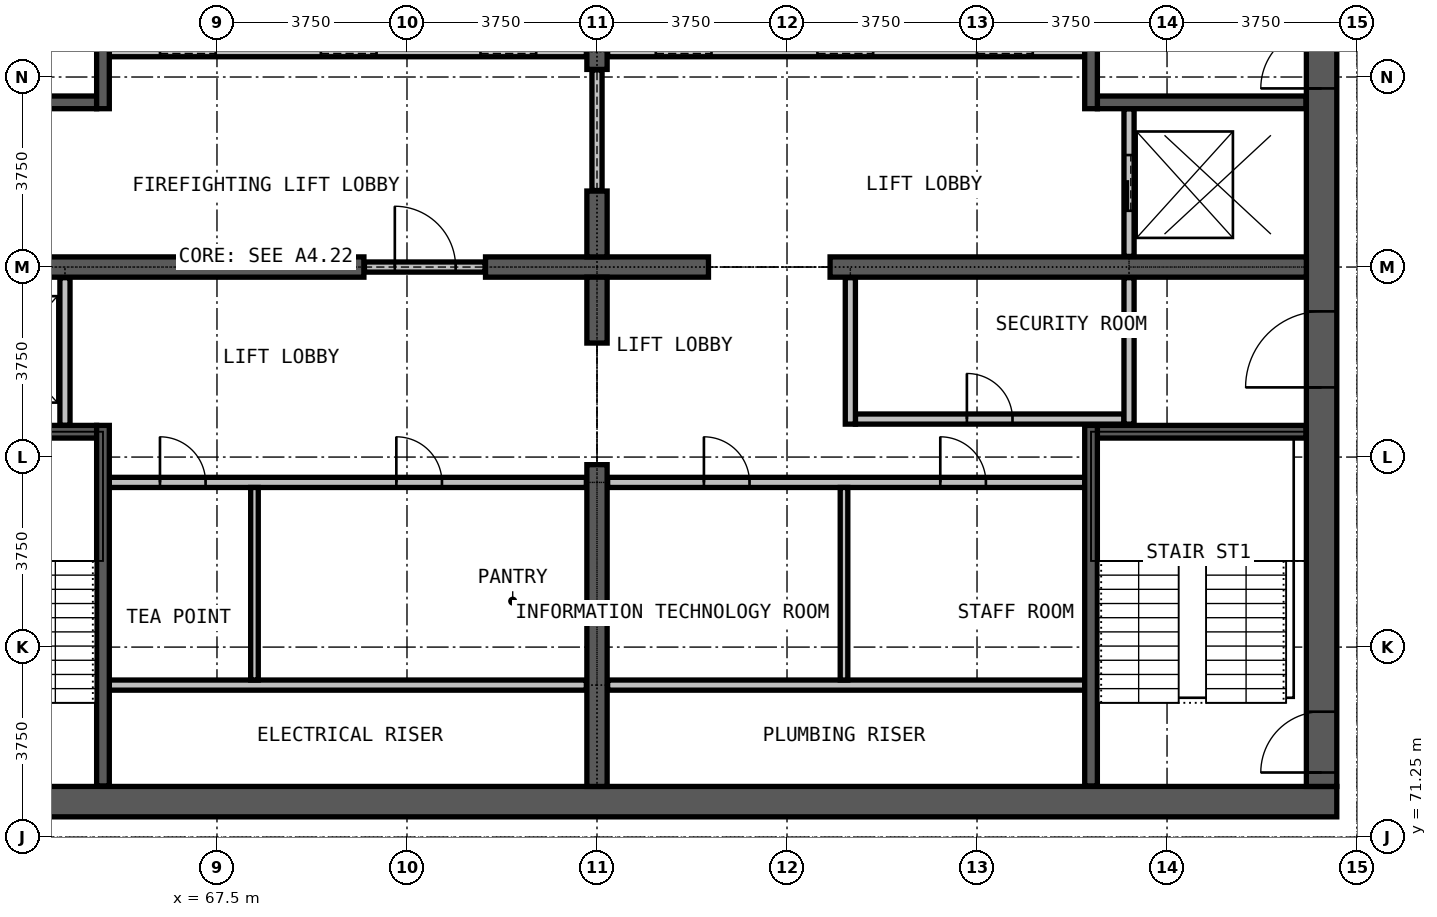
"""IFC4 building model, lengths in metres.
Left out: names, types, materials, properties, quantities, classifications, styles, units other than length and angle.
Written with IfcOpenShell. Run it as: python <this file> out.ifc"""

import sys

from ifc_helpers import new_model, si_unit, direction, frame, frame_2d, origin, place, context, subcontext, project, spatial, rectangle, extrude, element, fill, save


model = new_model("IFC4")
c1 = context("Model", 3, precision=1e-05, world=origin(), true_north=direction((0.0, 1.0)))
c2 = subcontext(c1, "Body", "Model", "MODEL_VIEW")
j1 = project(units=[si_unit("LENGTHUNIT", "METRE"), si_unit("PLANEANGLEUNIT", "RADIAN")], contexts=[c1])
p1 = place(None, origin())
s1 = spatial("IfcSite", under=j1, at=p1, CompositionType="ELEMENT")
p2 = place(p1, origin())
s2 = spatial("IfcBuilding", under=s1, at=p2, CompositionType="ELEMENT")
p3 = place(p2, frame((0.0, 0.0, 192.3)))
s3 = spatial("IfcBuildingStorey", under=s2, at=p3, CompositionType="ELEMENT", Elevation=192.3)
p4 = place(p3, frame((60.4, 71.95, 0.0), z_axis=(0.0, 0.0, 1.0), x_axis=(1.0, 0.0, 0.0)))
e1 = element("IfcWall", 1, at=p4, inside=s3, PredefinedType="SHEAR", context=c2, shape_type="SweptSolid", body=[
    extrude(rectangle(XDim=29.2, YDim=0.6, at=frame_2d((14.6, 0.0))), origin(), (0.0, 0.0, 1.0), 3.6),
])
p5 = place(p3, frame((89.3, 72.25, 0.0), z_axis=(0.0, 0.0, 1.0), x_axis=(0.0, 1.0, 0.0)))
e2 = element("IfcWall", 2, at=p5, inside=s3, PredefinedType="SHEAR", context=c2, shape_type="SweptSolid", body=[
    extrude(rectangle(XDim=20.5, YDim=0.6, at=frame_2d((10.25, 0.0))), origin(), (0.0, 0.0, 1.0), 3.6),
])
p6 = place(p5, frame((0.275, 0.0, 0.0)))
e3 = element("IfcOpeningElement", 3, at=p6, cuts=e2, PredefinedType="OPENING", context=c2, shape_type="SweptSolid", body=[
    extrude(rectangle(XDim=1.2, YDim=2.2, at=frame_2d((0.6, 1.1))), frame((0.0, 0.31, 0.0), z_axis=(0.0, -1.0, 0.0), x_axis=(1.0, 0.0, 0.0)), (0.0, 0.0, 1.0), 0.62),
])
p7 = place(p5, frame((13.775, 0.0, 0.0)))
e4 = element("IfcOpeningElement", 4, at=p7, cuts=e2, PredefinedType="OPENING", context=c2, shape_type="SweptSolid", body=[
    extrude(rectangle(XDim=1.2, YDim=2.2, at=frame_2d((0.6, 1.1))), frame((0.0, 0.31, 0.0), z_axis=(0.0, -1.0, 0.0), x_axis=(1.0, 0.0, 0.0)), (0.0, 0.0, 1.0), 0.62),
])
p8 = place(p5, frame((7.875, 0.0, 0.0)))
e5 = element("IfcOpeningElement", 5, at=p8, cuts=e2, PredefinedType="OPENING", context=c2, shape_type="SweptSolid", body=[
    extrude(rectangle(XDim=1.5, YDim=2.2, at=frame_2d((0.75, 1.1))), frame((0.0, 0.31, 0.0), z_axis=(0.0, -1.0, 0.0), x_axis=(1.0, 0.0, 0.0)), (0.0, 0.0, 1.0), 0.62),
])
p9 = place(p3, frame((61.0, 82.5, 0.0), z_axis=(0.0, 0.0, 1.0), x_axis=(1.0, 0.0, 0.0)))
e6 = element("IfcWall", 6, at=p9, inside=s3, PredefinedType="SHEAR", context=c2, shape_type="SweptSolid", body=[
    extrude(rectangle(XDim=9.4, YDim=0.4, at=frame_2d((4.7, 0.0))), origin(), (0.0, 0.0, 1.0), 3.6),
])
p10 = place(p3, frame((72.8, 82.5, 0.0), z_axis=(0.0, 0.0, 1.0), x_axis=(1.0, 0.0, 0.0)))
e7 = element("IfcWall", 7, at=p10, inside=s3, PredefinedType="SHEAR", context=c2, shape_type="SweptSolid", body=[
    extrude(rectangle(XDim=4.4, YDim=0.4, at=frame_2d((2.2, 0.0))), origin(), (0.0, 0.0, 1.0), 3.6),
])
p11 = place(p3, frame((79.6, 82.5, 0.0), z_axis=(0.0, 0.0, 1.0), x_axis=(1.0, 0.0, 0.0)))
e8 = element("IfcWall", 8, at=p11, inside=s3, PredefinedType="SHEAR", context=c2, shape_type="SweptSolid", body=[
    extrude(rectangle(XDim=9.4, YDim=0.4, at=frame_2d((4.7, 0.0))), origin(), (0.0, 0.0, 1.0), 3.6),
])
p12 = place(p3, frame((75.0, 72.25, 0.0), z_axis=(0.0, 0.0, 1.0), x_axis=(0.0, 1.0, 0.0)))
e9 = element("IfcWall", 9, at=p12, inside=s3, PredefinedType="SHEAR", context=c2, shape_type="SweptSolid", body=[
    extrude(rectangle(XDim=6.35, YDim=0.4, at=frame_2d((3.175, 0.0))), origin(), (0.0, 0.0, 1.0), 3.6),
])
for number, where, z_axis, x_axis in (
    (10, (75.0, 81.0, 0.0), (0.0, 0.0, 1.0), (0.0, 1.0, 0.0)),
    (11, (75.0, 82.7, 0.0), (0.0, 0.0, 1.0), (0.0, 1.0, 0.0)),
):
    element("IfcWall", number, at=place(p3, frame(where, z_axis=z_axis, x_axis=x_axis)), inside=s3, PredefinedType="SHEAR", context=c2, shape_type="SweptSolid", body=[
        extrude(rectangle(XDim=1.3, YDim=0.4, at=frame_2d((0.65, 0.0))), origin(), (0.0, 0.0, 1.0), 3.6),
    ])
p13 = place(p3, frame((75.0, 86.4, 0.0), z_axis=(0.0, 0.0, 1.0), x_axis=(0.0, 1.0, 0.0)))
e12 = element("IfcWall", 12, at=p13, inside=s3, PredefinedType="SHEAR", context=c2, shape_type="SweptSolid", body=[
    extrude(rectangle(XDim=6.35, YDim=0.4, at=frame_2d((3.175, 0.0))), origin(), (0.0, 0.0, 1.0), 3.6),
])
for number, where, z_axis, x_axis in (
    (13, (65.375, 74.25, 0.0), (0.0, 0.0, 1.0), (1.0, 0.0, 0.0)),
    (14, (75.21, 74.25, 0.0), (0.0, 0.0, 1.0), (1.0, 0.0, 0.0)),
):
    element("IfcWall", number, at=place(p3, frame(where, z_axis=z_axis, x_axis=x_axis)), inside=s3, PredefinedType="PARTITIONING", context=c2, shape_type="SweptSolid", body=[
        extrude(rectangle(XDim=9.415, YDim=0.2, at=frame_2d((4.708, 0.0))), origin(), (0.0, 0.0, 1.0), 3.3),
    ])
p14 = place(p3, frame((65.375, 78.25, 0.0), z_axis=(0.0, 0.0, 1.0), x_axis=(1.0, 0.0, 0.0)))
e15 = element("IfcWall", 15, at=p14, inside=s3, PredefinedType="PARTITIONING", context=c2, shape_type="SweptSolid", body=[
    extrude(rectangle(XDim=9.415, YDim=0.2, at=frame_2d((4.708, 0.0))), origin(), (0.0, 0.0, 1.0), 3.3),
])
p15 = place(p14, frame((1.0, 0.0, 0.0)))
e16 = element("IfcOpeningElement", 16, at=p15, cuts=e15, PredefinedType="OPENING", context=c2, shape_type="SweptSolid", body=[
    extrude(rectangle(XDim=0.9, YDim=2.2, at=frame_2d((0.45, 1.1))), frame((0.0, 0.11, 0.0), z_axis=(0.0, -1.0, 0.0), x_axis=(1.0, 0.0, 0.0)), (0.0, 0.0, 1.0), 0.22),
])
p16 = place(p14, frame((5.665, 0.0, 0.0)))
e17 = element("IfcOpeningElement", 17, at=p16, cuts=e15, PredefinedType="OPENING", context=c2, shape_type="SweptSolid", body=[
    extrude(rectangle(XDim=0.9, YDim=2.2, at=frame_2d((0.45, 1.1))), frame((0.0, 0.11, 0.0), z_axis=(0.0, -1.0, 0.0), x_axis=(1.0, 0.0, 0.0)), (0.0, 0.0, 1.0), 0.22),
])
p17 = place(p3, frame((75.21, 78.25, 0.0), z_axis=(0.0, 0.0, 1.0), x_axis=(1.0, 0.0, 0.0)))
e18 = element("IfcWall", 18, at=p17, inside=s3, PredefinedType="PARTITIONING", context=c2, shape_type="SweptSolid", body=[
    extrude(rectangle(XDim=9.415, YDim=0.2, at=frame_2d((4.708, 0.0))), origin(), (0.0, 0.0, 1.0), 3.3),
])
p18 = place(p17, frame((1.9, 0.0, 0.0)))
e19 = element("IfcOpeningElement", 19, at=p18, cuts=e18, PredefinedType="OPENING", context=c2, shape_type="SweptSolid", body=[
    extrude(rectangle(XDim=0.9, YDim=2.2, at=frame_2d((0.45, 1.1))), frame((0.0, 0.11, 0.0), z_axis=(0.0, -1.0, 0.0), x_axis=(1.0, 0.0, 0.0)), (0.0, 0.0, 1.0), 0.22),
])
p19 = place(p17, frame((6.565, 0.0, 0.0)))
e20 = element("IfcOpeningElement", 20, at=p19, cuts=e18, PredefinedType="OPENING", context=c2, shape_type="SweptSolid", body=[
    extrude(rectangle(XDim=0.9, YDim=2.2, at=frame_2d((0.45, 1.1))), frame((0.0, 0.11, 0.0), z_axis=(0.0, -1.0, 0.0), x_axis=(1.0, 0.0, 0.0)), (0.0, 0.0, 1.0), 0.22),
])
p20 = place(p3, frame((80.1, 79.5, 0.0), z_axis=(0.0, 0.0, 1.0), x_axis=(1.0, 0.0, 0.0)))
e21 = element("IfcWall", 21, at=p20, inside=s3, PredefinedType="PARTITIONING", context=c2, shape_type="SweptSolid", body=[
    extrude(rectangle(XDim=5.3, YDim=0.2, at=frame_2d((2.65, 0.0))), origin(), (0.0, 0.0, 1.0), 3.3),
])
p21 = place(p20, frame((2.2, 0.0, 0.0)))
e22 = element("IfcOpeningElement", 22, at=p21, cuts=e21, PredefinedType="OPENING", context=c2, shape_type="SweptSolid", body=[
    extrude(rectangle(XDim=0.9, YDim=2.2, at=frame_2d((0.45, 1.1))), frame((0.0, 0.11, 0.0), z_axis=(0.0, -1.0, 0.0), x_axis=(1.0, 0.0, 0.0)), (0.0, 0.0, 1.0), 0.22),
])
p22 = place(p3, frame((70.41, 82.5, 0.0), z_axis=(0.0, 0.0, 1.0), x_axis=(1.0, 0.0, 0.0)))
e23 = element("IfcWall", 23, at=p22, inside=s3, PredefinedType="PARTITIONING", context=c2, shape_type="SweptSolid", body=[
    extrude(rectangle(XDim=2.38, YDim=0.2, at=frame_2d((1.19, 0.0))), origin(), (0.0, 0.0, 1.0), 2.4),
])
p23 = place(p22, frame((0.6, 0.0, 0.0)))
e24 = element("IfcOpeningElement", 24, at=p23, cuts=e23, PredefinedType="OPENING", context=c2, shape_type="SweptSolid", body=[
    extrude(rectangle(XDim=1.2, YDim=2.2, at=frame_2d((0.6, 1.1))), frame((0.0, 0.11, 0.0), z_axis=(0.0, -1.0, 0.0), x_axis=(1.0, 0.0, 0.0)), (0.0, 0.0, 1.0), 0.22),
])
p24 = place(p3, frame((75.0, 84.01, 0.0), z_axis=(0.0, 0.0, 1.0), x_axis=(0.0, 1.0, 0.0)))
e25 = element("IfcWall", 25, at=p24, inside=s3, PredefinedType="PARTITIONING", context=c2, shape_type="SweptSolid", body=[
    extrude(rectangle(XDim=2.38, YDim=0.2, at=frame_2d((1.19, 0.0))), origin(), (0.0, 0.0, 1.0), 2.4),
])
for number, where, z_axis, x_axis in (
    (26, (80.0, 79.4, 0.0), (0.0, 0.0, 1.0), (0.0, 1.0, 0.0)),
    (27, (85.5, 79.4, 0.0), (0.0, 0.0, 1.0), (0.0, 1.0, 0.0)),
):
    element("IfcWall", number, at=place(p3, frame(where, z_axis=z_axis, x_axis=x_axis)), inside=s3, PredefinedType="PARTITIONING", context=c2, shape_type="SweptSolid", body=[
        extrude(rectangle(XDim=2.89, YDim=0.2, at=frame_2d((1.445, 0.0))), origin(), (0.0, 0.0, 1.0), 3.3),
    ])
for number, where, z_axis, x_axis in (
    (28, (68.24, 74.35, 0.0), (0.0, 0.0, 1.0), (0.0, 1.0, 0.0)),
    (29, (79.875, 74.35, 0.0), (0.0, 0.0, 1.0), (0.0, 1.0, 0.0)),
):
    element("IfcWall", number, at=place(p3, frame(where, z_axis=z_axis, x_axis=x_axis)), inside=s3, PredefinedType="PARTITIONING", context=c2, shape_type="SweptSolid", body=[
        extrude(rectangle(XDim=3.8, YDim=0.15, at=frame_2d((1.9, 0.0))), origin(), (0.0, 0.0, 1.0), 3.3),
    ])
p25 = place(p3, frame((65.375, 86.75, 0.0), z_axis=(0.0, 0.0, 1.0), x_axis=(1.0, 0.0, 0.0)))
e30 = element("IfcWall", 30, at=p25, inside=s3, PredefinedType="PARTITIONING", context=c2, shape_type="SweptSolid", body=[
    extrude(rectangle(XDim=9.415, YDim=0.2, at=frame_2d((4.708, 0.0))), origin(), (0.0, 0.0, 1.0), 3.3),
])
p26 = place(p25, frame((1.0, 0.0, 0.0)))
e31 = element("IfcOpeningElement", 31, at=p26, cuts=e30, PredefinedType="OPENING", context=c2, shape_type="SweptSolid", body=[
    extrude(rectangle(XDim=1.1, YDim=2.2, at=frame_2d((0.55, 1.1))), frame((0.0, 0.11, 0.0), z_axis=(0.0, -1.0, 0.0), x_axis=(1.0, 0.0, 0.0)), (0.0, 0.0, 1.0), 0.22),
])
p27 = place(p25, frame((4.175, 0.0, 0.0)))
e32 = element("IfcOpeningElement", 32, at=p27, cuts=e30, PredefinedType="OPENING", context=c2, shape_type="SweptSolid", body=[
    extrude(rectangle(XDim=1.1, YDim=2.2, at=frame_2d((0.55, 1.1))), frame((0.0, 0.11, 0.0), z_axis=(0.0, -1.0, 0.0), x_axis=(1.0, 0.0, 0.0)), (0.0, 0.0, 1.0), 0.22),
])
p28 = place(p25, frame((7.325, 0.0, 0.0)))
e33 = element("IfcOpeningElement", 33, at=p28, cuts=e30, PredefinedType="OPENING", context=c2, shape_type="SweptSolid", body=[
    extrude(rectangle(XDim=1.1, YDim=2.2, at=frame_2d((0.55, 1.1))), frame((0.0, 0.11, 0.0), z_axis=(0.0, -1.0, 0.0), x_axis=(1.0, 0.0, 0.0)), (0.0, 0.0, 1.0), 0.22),
])
p29 = place(p3, frame((75.21, 86.75, 0.0), z_axis=(0.0, 0.0, 1.0), x_axis=(1.0, 0.0, 0.0)))
e34 = element("IfcWall", 34, at=p29, inside=s3, PredefinedType="PARTITIONING", context=c2, shape_type="SweptSolid", body=[
    extrude(rectangle(XDim=9.415, YDim=0.2, at=frame_2d((4.708, 0.0))), origin(), (0.0, 0.0, 1.0), 3.3),
])
p30 = place(p29, frame((0.95, 0.0, 0.0)))
e35 = element("IfcOpeningElement", 35, at=p30, cuts=e34, PredefinedType="OPENING", context=c2, shape_type="SweptSolid", body=[
    extrude(rectangle(XDim=1.1, YDim=2.2, at=frame_2d((0.55, 1.1))), frame((0.0, 0.11, 0.0), z_axis=(0.0, -1.0, 0.0), x_axis=(1.0, 0.0, 0.0)), (0.0, 0.0, 1.0), 0.22),
])
p31 = place(p29, frame((4.14, 0.0, 0.0)))
e36 = element("IfcOpeningElement", 36, at=p31, cuts=e34, PredefinedType="OPENING", context=c2, shape_type="SweptSolid", body=[
    extrude(rectangle(XDim=1.1, YDim=2.2, at=frame_2d((0.55, 1.1))), frame((0.0, 0.11, 0.0), z_axis=(0.0, -1.0, 0.0), x_axis=(1.0, 0.0, 0.0)), (0.0, 0.0, 1.0), 0.22),
])
p32 = place(p29, frame((7.29, 0.0, 0.0)))
e37 = element("IfcOpeningElement", 37, at=p32, cuts=e34, PredefinedType="OPENING", context=c2, shape_type="SweptSolid", body=[
    extrude(rectangle(XDim=1.1, YDim=2.2, at=frame_2d((0.55, 1.1))), frame((0.0, 0.11, 0.0), z_axis=(0.0, -1.0, 0.0), x_axis=(1.0, 0.0, 0.0)), (0.0, 0.0, 1.0), 0.22),
])
p33 = place(p3, frame((64.5, 79.375, 0.0), z_axis=(0.0, 0.0, 1.0), x_axis=(0.0, 1.0, 0.0)))
e38 = element("IfcWall", 38, at=p33, inside=s3, PredefinedType="PARTITIONING", context=c2, shape_type="SweptSolid", body=[
    extrude(rectangle(XDim=2.915, YDim=0.2, at=frame_2d((1.458, 0.0))), origin(), (0.0, 0.0, 1.0), 3.3),
])
p34 = place(p3, frame((85.5, 82.71, 0.0), z_axis=(0.0, 0.0, 1.0), x_axis=(0.0, 1.0, 0.0)))
e39 = element("IfcWall", 39, at=p34, inside=s3, PredefinedType="PARTITIONING", context=c2, shape_type="SweptSolid", body=[
    extrude(rectangle(XDim=2.915, YDim=0.2, at=frame_2d((1.458, 0.0))), origin(), (0.0, 0.0, 1.0), 3.3),
])
p35 = place(p34, frame((0.9, 0.0, 0.0)))
e40 = element("IfcOpeningElement", 40, at=p35, cuts=e39, PredefinedType="OPENING", context=c2, shape_type="SweptSolid", body=[
    extrude(rectangle(XDim=1.1, YDim=2.2, at=frame_2d((0.55, 1.1))), frame((0.0, 0.11, 0.0), z_axis=(0.0, -1.0, 0.0), x_axis=(1.0, 0.0, 0.0)), (0.0, 0.0, 1.0), 0.22),
])
for number, where, z_axis, x_axis in (
    (41, (61.01, 79.25, 0.0), (0.0, 0.0, 1.0), (1.0, 0.0, 0.0)),
    (42, (84.875, 79.25, 0.0), (0.0, 0.0, 1.0), (1.0, 0.0, 0.0)),
):
    element("IfcWall", number, at=place(p3, frame(where, z_axis=z_axis, x_axis=x_axis)), inside=s3, PredefinedType="PARTITIONING", context=c2, shape_type="SweptSolid", body=[
        extrude(rectangle(XDim=4.115, YDim=0.25, at=frame_2d((2.058, 0.0))), origin(), (0.0, 0.0, 1.0), 3.3),
    ])
p36 = place(p3, frame((61.01, 85.75, 0.0), z_axis=(0.0, 0.0, 1.0), x_axis=(1.0, 0.0, 0.0)))
e43 = element("IfcWall", 43, at=p36, inside=s3, PredefinedType="PARTITIONING", context=c2, shape_type="SweptSolid", body=[
    extrude(rectangle(XDim=4.115, YDim=0.25, at=frame_2d((2.058, 0.0))), origin(), (0.0, 0.0, 1.0), 3.3),
])
p37 = place(p36, frame((1.45, 0.0, 0.0)))
e44 = element("IfcOpeningElement", 44, at=p37, cuts=e43, PredefinedType="OPENING", context=c2, shape_type="SweptSolid", body=[
    extrude(rectangle(XDim=1.2, YDim=2.2, at=frame_2d((0.6, 1.1))), frame((0.0, 0.135, 0.0), z_axis=(0.0, -1.0, 0.0), x_axis=(1.0, 0.0, 0.0)), (0.0, 0.0, 1.0), 0.27),
])
p38 = place(p3, frame((84.875, 85.75, 0.0), z_axis=(0.0, 0.0, 1.0), x_axis=(1.0, 0.0, 0.0)))
e45 = element("IfcWall", 45, at=p38, inside=s3, PredefinedType="PARTITIONING", context=c2, shape_type="SweptSolid", body=[
    extrude(rectangle(XDim=4.115, YDim=0.25, at=frame_2d((2.058, 0.0))), origin(), (0.0, 0.0, 1.0), 3.3),
])
for number, where, z_axis, x_axis in (
    (46, (65.25, 72.26, 0.0), (0.0, 0.0, 1.0), (0.0, 1.0, 0.0)),
    (47, (65.25, 85.625, 0.0), (0.0, 0.0, 1.0), (0.0, 1.0, 0.0)),
    (48, (84.75, 72.26, 0.0), (0.0, 0.0, 1.0), (0.0, 1.0, 0.0)),
    (49, (84.75, 85.625, 0.0), (0.0, 0.0, 1.0), (0.0, 1.0, 0.0)),
):
    element("IfcWall", number, at=place(p3, frame(where, z_axis=z_axis, x_axis=x_axis)), inside=s3, PredefinedType="PARTITIONING", context=c2, shape_type="SweptSolid", body=[
        extrude(rectangle(XDim=7.115, YDim=0.25, at=frame_2d((3.558, 0.0))), origin(), (0.0, 0.0, 1.0), 3.3),
    ])
p39 = place(p30, origin())
e50 = element("IfcDoor", 50, at=p39, inside=s3, OperationType="DOUBLE_DOOR_SLIDING", PredefinedType="DOOR", context=c2, shape_type="SweptSolid", body=[
    extrude(rectangle(XDim=1.1, YDim=2.2, at=frame_2d((0.55, 1.1))), frame((0.0, 0.025, 0.0), z_axis=(0.0, -1.0, 0.0), x_axis=(1.0, 0.0, 0.0)), (0.0, 0.0, 1.0), 0.05),
])
fill(e35, e50)
p40 = place(p31, origin())
e51 = element("IfcDoor", 51, at=p40, inside=s3, OperationType="DOUBLE_DOOR_SLIDING", PredefinedType="DOOR", context=c2, shape_type="SweptSolid", body=[
    extrude(rectangle(XDim=1.1, YDim=2.2, at=frame_2d((0.55, 1.1))), frame((0.0, 0.025, 0.0), z_axis=(0.0, -1.0, 0.0), x_axis=(1.0, 0.0, 0.0)), (0.0, 0.0, 1.0), 0.05),
])
fill(e36, e51)
p41 = place(p32, origin())
e52 = element("IfcDoor", 52, at=p41, inside=s3, OperationType="DOUBLE_DOOR_SLIDING", PredefinedType="DOOR", context=c2, shape_type="SweptSolid", body=[
    extrude(rectangle(XDim=1.1, YDim=2.2, at=frame_2d((0.55, 1.1))), frame((0.0, 0.025, 0.0), z_axis=(0.0, -1.0, 0.0), x_axis=(1.0, 0.0, 0.0)), (0.0, 0.0, 1.0), 0.05),
])
fill(e37, e52)
p42 = place(p26, origin())
e53 = element("IfcDoor", 53, at=p42, inside=s3, OperationType="DOUBLE_DOOR_SLIDING", PredefinedType="DOOR", context=c2, shape_type="SweptSolid", body=[
    extrude(rectangle(XDim=1.1, YDim=2.2, at=frame_2d((0.55, 1.1))), frame((0.0, 0.025, 0.0), z_axis=(0.0, -1.0, 0.0), x_axis=(1.0, 0.0, 0.0)), (0.0, 0.0, 1.0), 0.05),
])
fill(e31, e53)
p43 = place(p27, origin())
e54 = element("IfcDoor", 54, at=p43, inside=s3, OperationType="DOUBLE_DOOR_SLIDING", PredefinedType="DOOR", context=c2, shape_type="SweptSolid", body=[
    extrude(rectangle(XDim=1.1, YDim=2.2, at=frame_2d((0.55, 1.1))), frame((0.0, 0.025, 0.0), z_axis=(0.0, -1.0, 0.0), x_axis=(1.0, 0.0, 0.0)), (0.0, 0.0, 1.0), 0.05),
])
fill(e32, e54)
p44 = place(p28, origin())
e55 = element("IfcDoor", 55, at=p44, inside=s3, OperationType="DOUBLE_DOOR_SLIDING", PredefinedType="DOOR", context=c2, shape_type="SweptSolid", body=[
    extrude(rectangle(XDim=1.1, YDim=2.2, at=frame_2d((0.55, 1.1))), frame((0.0, 0.025, 0.0), z_axis=(0.0, -1.0, 0.0), x_axis=(1.0, 0.0, 0.0)), (0.0, 0.0, 1.0), 0.05),
])
fill(e33, e55)
p45 = place(p35, origin())
e56 = element("IfcDoor", 56, at=p45, inside=s3, OperationType="DOUBLE_DOOR_SLIDING", PredefinedType="DOOR", context=c2, shape_type="SweptSolid", body=[
    extrude(rectangle(XDim=1.1, YDim=2.2, at=frame_2d((0.55, 1.1))), frame((0.0, 0.025, 0.0), z_axis=(0.0, -1.0, 0.0), x_axis=(1.0, 0.0, 0.0)), (0.0, 0.0, 1.0), 0.05),
])
fill(e40, e56)
p46 = place(p23, origin())
e57 = element("IfcDoor", 57, at=p46, inside=s3, OperationType="SINGLE_SWING_LEFT", PredefinedType="DOOR", context=c2, shape_type="SweptSolid", body=[
    extrude(rectangle(XDim=1.2, YDim=2.2, at=frame_2d((0.6, 1.1))), frame((0.0, 0.025, 0.0), z_axis=(0.0, -1.0, 0.0), x_axis=(1.0, 0.0, 0.0)), (0.0, 0.0, 1.0), 0.05),
])
fill(e24, e57)
p47 = place(p6, origin())
e58 = element("IfcDoor", 58, at=p47, inside=s3, OperationType="SINGLE_SWING_LEFT", PredefinedType="DOOR", context=c2, shape_type="SweptSolid", body=[
    extrude(rectangle(XDim=1.2, YDim=2.2, at=frame_2d((0.6, 1.1))), frame((0.0, 0.025, 0.0), z_axis=(0.0, -1.0, 0.0), x_axis=(1.0, 0.0, 0.0)), (0.0, 0.0, 1.0), 0.05),
])
fill(e3, e58)
p48 = place(p7, origin())
e59 = element("IfcDoor", 59, at=p48, inside=s3, OperationType="SINGLE_SWING_LEFT", PredefinedType="DOOR", context=c2, shape_type="SweptSolid", body=[
    extrude(rectangle(XDim=1.2, YDim=2.2, at=frame_2d((0.6, 1.1))), frame((0.0, 0.025, 0.0), z_axis=(0.0, -1.0, 0.0), x_axis=(1.0, 0.0, 0.0)), (0.0, 0.0, 1.0), 0.05),
])
fill(e4, e59)
p49 = place(p8, origin())
e60 = element("IfcDoor", 60, at=p49, inside=s3, OperationType="DOUBLE_DOOR_SINGLE_SWING", PredefinedType="DOOR", context=c2, shape_type="SweptSolid", body=[
    extrude(rectangle(XDim=1.5, YDim=2.2, at=frame_2d((0.75, 1.1))), frame((0.0, 0.025, 0.0), z_axis=(0.0, -1.0, 0.0), x_axis=(1.0, 0.0, 0.0)), (0.0, 0.0, 1.0), 0.05),
])
fill(e5, e60)
p50 = place(p21, origin())
e61 = element("IfcDoor", 61, at=p50, inside=s3, OperationType="SINGLE_SWING_LEFT", PredefinedType="DOOR", context=c2, shape_type="SweptSolid", body=[
    extrude(rectangle(XDim=0.9, YDim=2.2, at=frame_2d((0.45, 1.1))), frame((0.0, 0.025, 0.0), z_axis=(0.0, -1.0, 0.0), x_axis=(1.0, 0.0, 0.0)), (0.0, 0.0, 1.0), 0.05),
])
fill(e22, e61)
p51 = place(p15, origin())
e62 = element("IfcDoor", 62, at=p51, inside=s3, OperationType="SINGLE_SWING_LEFT", PredefinedType="DOOR", context=c2, shape_type="SweptSolid", body=[
    extrude(rectangle(XDim=0.9, YDim=2.2, at=frame_2d((0.45, 1.1))), frame((0.0, 0.025, 0.0), z_axis=(0.0, -1.0, 0.0), x_axis=(1.0, 0.0, 0.0)), (0.0, 0.0, 1.0), 0.05),
])
fill(e16, e62)
p52 = place(p16, origin())
e63 = element("IfcDoor", 63, at=p52, inside=s3, OperationType="SINGLE_SWING_RIGHT", PredefinedType="DOOR", context=c2, shape_type="SweptSolid", body=[
    extrude(rectangle(XDim=0.9, YDim=2.2, at=frame_2d((0.45, 1.1))), frame((0.0, 0.025, 0.0), z_axis=(0.0, -1.0, 0.0), x_axis=(1.0, 0.0, 0.0)), (0.0, 0.0, 1.0), 0.05),
])
fill(e17, e63)
p53 = place(p18, origin())
e64 = element("IfcDoor", 64, at=p53, inside=s3, OperationType="SINGLE_SWING_RIGHT", PredefinedType="DOOR", context=c2, shape_type="SweptSolid", body=[
    extrude(rectangle(XDim=0.9, YDim=2.2, at=frame_2d((0.45, 1.1))), frame((0.0, 0.025, 0.0), z_axis=(0.0, -1.0, 0.0), x_axis=(1.0, 0.0, 0.0)), (0.0, 0.0, 1.0), 0.05),
])
fill(e19, e64)
p54 = place(p19, origin())
e65 = element("IfcDoor", 65, at=p54, inside=s3, OperationType="SINGLE_SWING_LEFT", PredefinedType="DOOR", context=c2, shape_type="SweptSolid", body=[
    extrude(rectangle(XDim=0.9, YDim=2.2, at=frame_2d((0.45, 1.1))), frame((0.0, 0.025, 0.0), z_axis=(0.0, -1.0, 0.0), x_axis=(1.0, 0.0, 0.0)), (0.0, 0.0, 1.0), 0.05),
])
fill(e20, e65)
save(model, sys.argv[1])
